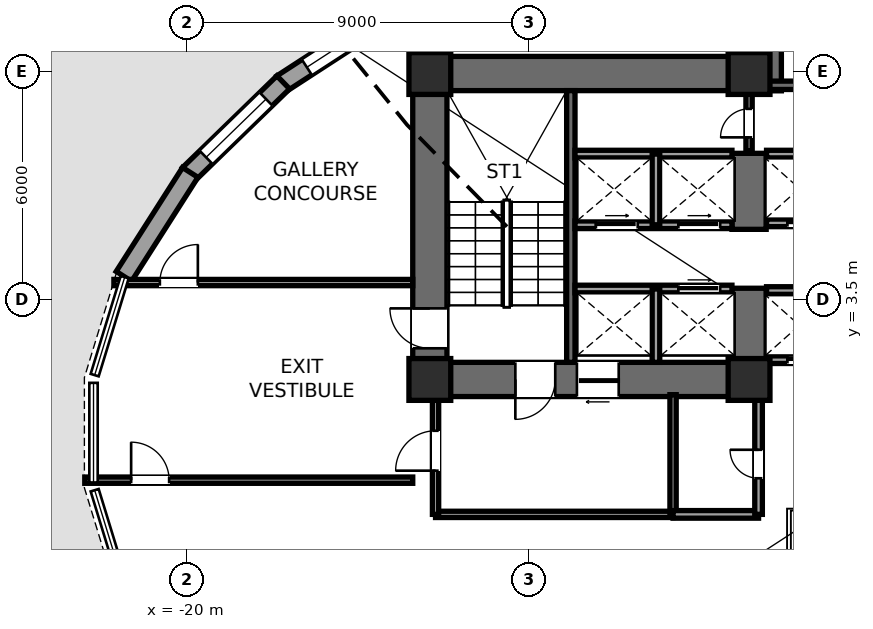
"""IFC4 building model, lengths in metres.
Left out: names, types, materials, properties, quantities, classifications, styles, units other than length and angle.
Written with IfcOpenShell. Run it as: python <this file> out.ifc"""

import sys

from ifc_helpers import new_model, si_unit, direction, frame, frame_2d, origin, origin_2d, place, context, subcontext, project, spatial, rectangle, extrude, element, fill, save


model = new_model("IFC4")
c1 = context("Model", 3, precision=1e-05, world=origin(), true_north=direction((0.0, 1.0)))
c2 = subcontext(c1, "Body", "Model", "MODEL_VIEW")
j1 = project(units=[si_unit("LENGTHUNIT", "METRE"), si_unit("PLANEANGLEUNIT", "RADIAN")], contexts=[c1])
p1 = place(None, origin())
s1 = spatial("IfcSite", under=j1, at=p1, CompositionType="ELEMENT")
p2 = place(p1, origin())
s2 = spatial("IfcBuilding", under=s1, at=p2, CompositionType="ELEMENT")
p3 = place(p2, origin())
s3 = spatial("IfcBuildingStorey", under=s2, at=p3, CompositionType="ELEMENT", Elevation=0.0)
p4 = place(p3, frame((-13.6, 0.95, 0.0), z_axis=(0.0, 0.0, 1.0), x_axis=(0.0, 1.0, 0.0)))
e1 = element("IfcWall", 1, at=p4, inside=s3, PredefinedType="SHEAR", context=c2, shape_type="SweptSolid", body=[
    extrude(rectangle(XDim=8.95, YDim=0.9, at=frame_2d((4.475, 0.0))), origin(), (0.0, 0.0, 1.0), 6.0),
])
p5 = place(p4, frame((1.27, 0.0, 0.0)))
e2 = element("IfcOpeningElement", 2, at=p5, cuts=e1, PredefinedType="OPENING", context=c2, shape_type="SweptSolid", body=[
    extrude(rectangle(XDim=1.05, YDim=2.15, at=frame_2d((0.525, 1.075))), frame((0.0, 0.46, 0.0), z_axis=(0.0, -1.0, 0.0), x_axis=(1.0, 0.0, 0.0)), (0.0, 0.0, 1.0), 0.92),
])
p6 = place(p3, frame((-14.05, 9.45, 0.0), z_axis=(0.0, 0.0, 1.0), x_axis=(1.0, 0.0, 0.0)))
e3 = element("IfcWall", 3, at=p6, inside=s3, PredefinedType="SHEAR", context=c2, shape_type="SweptSolid", body=[
    extrude(rectangle(XDim=9.7, YDim=0.9, at=frame_2d((4.85, 0.0))), origin(), (0.0, 0.0, 1.0), 6.0),
])
p7 = place(p3, frame((-4.75, 1.4, 0.0), z_axis=(0.0, 0.0, 1.0), x_axis=(-1.0, 0.0, 0.0)))
e4 = element("IfcWall", 4, at=p7, inside=s3, PredefinedType="SHEAR", context=c2, shape_type="SweptSolid", body=[
    extrude(rectangle(XDim=9.3, YDim=0.9, at=frame_2d((4.65, 0.0))), origin(), (0.0, 0.0, 1.0), 6.0),
])
p8 = place(p7, frame((5.55, 0.0, 0.0)))
e5 = element("IfcOpeningElement", 5, at=p8, cuts=e4, PredefinedType="OPENING", context=c2, shape_type="SweptSolid", body=[
    extrude(rectangle(XDim=1.05, YDim=2.15, at=frame_2d((0.525, 1.075))), frame((0.0, 0.46, 0.0), z_axis=(0.0, -1.0, 0.0), x_axis=(1.0, 0.0, 0.0)), (0.0, 0.0, 1.0), 0.92),
])
p9 = place(p7, frame((3.88, 0.0, 0.0)))
e6 = element("IfcOpeningElement", 6, at=p9, cuts=e4, PredefinedType="OPENING", context=c2, shape_type="SweptSolid", body=[
    extrude(rectangle(XDim=1.1, YDim=2.2, at=frame_2d((0.55, 1.1))), frame((0.0, 0.46, 0.0), z_axis=(0.0, -1.0, 0.0), x_axis=(1.0, 0.0, 0.0)), (0.0, 0.0, 1.0), 0.92),
])
p10 = place(p3, frame((-5.2, 0.95, 0.0), z_axis=(0.0, 0.0, 1.0), x_axis=(0.0, 1.0, 0.0)))
e7 = element("IfcWall", 7, at=p10, inside=s3, PredefinedType="SHEAR", context=c2, shape_type="SweptSolid", body=[
    extrude(rectangle(XDim=2.85, YDim=0.9, at=frame_2d((1.425, 0.0))), origin(), (0.0, 0.0, 1.0), 6.0),
])
p11 = place(p3, frame((-5.2, 5.35, 0.0), z_axis=(0.0, 0.0, 1.0), x_axis=(0.0, 1.0, 0.0)))
e8 = element("IfcWall", 8, at=p11, inside=s3, PredefinedType="SHEAR", context=c2, shape_type="SweptSolid", body=[
    extrude(rectangle(XDim=2.0, YDim=0.9, at=frame_2d((1.0, 0.0))), origin(), (0.0, 0.0, 1.0), 6.0),
])
p12 = place(p3, frame((-9.89, 1.85, 0.0), z_axis=(0.0, 0.0, 1.0), x_axis=(0.0, 1.0, 0.0)))
e9 = element("IfcWall", 9, at=p12, inside=s3, PredefinedType="SHEAR", context=c2, shape_type="SweptSolid", body=[
    extrude(rectangle(XDim=7.15, YDim=0.22, at=frame_2d((3.575, 0.0))), origin(), (0.0, 0.0, 1.0), 6.0),
])
p13 = place(p3, frame((-4.8, 9.0, 0.0), z_axis=(0.0, 0.0, 1.0), x_axis=(0.0, 1.0, 0.0)))
e10 = element("IfcWall", 10, at=p13, inside=s3, PredefinedType="SHEAR", context=c2, shape_type="SweptSolid", body=[
    extrude(rectangle(XDim=4.3, YDim=0.9, at=frame_2d((2.15, 0.0))), origin(), (0.0, 0.0, 1.0), 6.0),
])
p14 = place(p3, frame((-4.7, 9.14, 0.0), z_axis=(0.0, 0.0, 1.0), x_axis=(1.0, 0.0, 0.0)))
e11 = element("IfcWall", 11, at=p14, inside=s3, PredefinedType="SHEAR", context=c2, shape_type="SweptSolid", body=[
    extrude(rectangle(XDim=9.3, YDim=0.22, at=frame_2d((4.65, 0.0))), origin(), (0.0, 0.0, 1.0), 6.0),
])
p15 = place(p14, frame((1.15, 0.0, 0.0)))
e12 = element("IfcOpeningElement", 12, at=p15, cuts=e11, PredefinedType="OPENING", context=c2, shape_type="SweptSolid", body=[
    extrude(rectangle(XDim=1.05, YDim=2.15, at=frame_2d((0.525, 1.075))), frame((0.0, 0.12, 0.0), z_axis=(0.0, -1.0, 0.0), x_axis=(1.0, 0.0, 0.0)), (0.0, 0.0, 1.0), 0.24),
])
for number, where, z_axis, x_axis in (
    (13, (-13.6, 1.4, 0.0), (0.0, 0.0, 1.0), (1.0, 0.0, 0.0)),
    (14, (-13.6, 9.45, 0.0), (0.0, 0.0, 1.0), (1.0, 0.0, 0.0)),
    (15, (-5.2, 1.4, 0.0), (0.0, 0.0, 1.0), (1.0, 0.0, 0.0)),
    (16, (-5.2, 9.45, 0.0), (0.0, 0.0, 1.0), (1.0, 0.0, 0.0)),
):
    element("IfcColumn", number, at=place(p3, frame(where, z_axis=z_axis, x_axis=x_axis)), inside=s3, PredefinedType="COLUMN", context=c2, shape_type="SweptSolid", body=[
        extrude(rectangle(XDim=1.1, YDim=1.1, at=origin_2d()), origin(), (0.0, 0.0, 1.0), 6.0),
    ])
p16 = place(p3, frame((-17.494, 9.188, 0.0), z_axis=(0.0, 0.0, 1.0), x_axis=(0.838776546814, 0.544475807098, 0.0)))
e17 = element("IfcWall", 17, at=p16, inside=s3, PredefinedType="STANDARD", context=c2, shape_type="SweptSolid", body=[
    extrude(rectangle(XDim=3.768, YDim=0.48, at=frame_2d((1.884, 0.0))), origin(), (0.0, 0.0, 1.0), 4.913),
])
p17 = place(p16, frame((0.784, 0.0, 0.85)))
e18 = element("IfcOpeningElement", 18, at=p17, cuts=e17, PredefinedType="OPENING", context=c2, shape_type="SweptSolid", body=[
    extrude(rectangle(XDim=2.2, YDim=1.95, at=frame_2d((1.1, 0.975))), frame((0.0, 0.25, 0.0), z_axis=(0.0, -1.0, 0.0), x_axis=(1.0, 0.0, 0.0)), (0.0, 0.0, 1.0), 0.5),
])
p18 = place(p3, frame((-19.941, 6.805, 0.0), z_axis=(0.0, 0.0, 1.0), x_axis=(0.717293479468, 0.696771170696, 0.0)))
e19 = element("IfcWall", 19, at=p18, inside=s3, PredefinedType="STANDARD", context=c2, shape_type="SweptSolid", body=[
    extrude(rectangle(XDim=3.462, YDim=0.48, at=frame_2d((1.731, 0.0))), origin(), (0.0, 0.0, 1.0), 4.913),
])
p19 = place(p18, frame((0.631, 0.0, 0.85)))
e20 = element("IfcOpeningElement", 20, at=p19, cuts=e19, PredefinedType="OPENING", context=c2, shape_type="SweptSolid", body=[
    extrude(rectangle(XDim=2.2, YDim=1.95, at=frame_2d((1.1, 0.975))), frame((0.0, 0.25, 0.0), z_axis=(0.0, -1.0, 0.0), x_axis=(1.0, 0.0, 0.0)), (0.0, 0.0, 1.0), 0.5),
])
p20 = place(p3, frame((-21.651, 4.112, 0.0), z_axis=(0.0, 0.0, 1.0), x_axis=(0.537902363654, 0.843007145388, 0.0)))
e21 = element("IfcWall", 21, at=p20, inside=s3, PredefinedType="STANDARD", context=c2, shape_type="SweptSolid", body=[
    extrude(rectangle(XDim=3.245, YDim=0.48, at=frame_2d((1.623, 0.0))), origin(), (0.0, 0.0, 1.0), 4.913),
])
p21 = place(p3, frame((-13.45, -2.15, 0.0), z_axis=(0.0, 0.0, 1.0), x_axis=(1.0, 0.0, 0.0)))
e22 = element("IfcWall", 22, at=p21, inside=s3, PredefinedType="PARTITIONING", context=c2, shape_type="SweptSolid", body=[
    extrude(rectangle(XDim=6.25, YDim=0.165, at=frame_2d((3.125, 0.0))), origin(), (0.0, 0.0, 1.0), 5.78),
])
p22 = place(p3, frame((-13.45, -2.15, 0.0), z_axis=(0.0, 0.0, 1.0), x_axis=(0.0, 1.0, 0.0)))
e23 = element("IfcWall", 23, at=p22, inside=s3, PredefinedType="PARTITIONING", context=c2, shape_type="SweptSolid", body=[
    extrude(rectangle(XDim=3.15, YDim=0.165, at=frame_2d((1.575, 0.0))), origin(), (0.0, 0.0, 1.0), 5.233),
])
p23 = place(p22, frame((1.15, 0.0, 0.0)))
e24 = element("IfcOpeningElement", 24, at=p23, cuts=e23, PredefinedType="OPENING", context=c2, shape_type="SweptSolid", body=[
    extrude(rectangle(XDim=1.05, YDim=2.15, at=frame_2d((0.525, 1.075))), frame((0.0, 0.093, 0.0), z_axis=(0.0, -1.0, 0.0), x_axis=(1.0, 0.0, 0.0)), (0.0, 0.0, 1.0), 0.185),
])
p24 = place(p3, frame((-7.2, -2.15, 0.0), z_axis=(0.0, 0.0, 1.0), x_axis=(0.0, 1.0, 0.0)))
e25 = element("IfcWall", 25, at=p24, inside=s3, PredefinedType="PARTITIONING", context=c2, shape_type="SweptSolid", body=[
    extrude(rectangle(XDim=3.15, YDim=0.165, at=frame_2d((1.575, 0.0))), origin(), (0.0, 0.0, 1.0), 5.78),
])
p25 = place(p3, frame((-7.2, -2.15, 0.0), z_axis=(0.0, 0.0, 1.0), x_axis=(1.0, 0.0, 0.0)))
e26 = element("IfcWall", 26, at=p25, inside=s3, PredefinedType="SOLIDWALL", context=c2, shape_type="SweptSolid", body=[
    extrude(rectangle(XDim=2.25, YDim=0.2, at=frame_2d((1.125, 0.0))), origin(), (0.0, 0.0, 1.0), 5.78),
])
p26 = place(p3, frame((-4.95, -2.15, 0.0), z_axis=(0.0, 0.0, 1.0), x_axis=(0.0, 1.0, 0.0)))
e27 = element("IfcWall", 27, at=p26, inside=s3, PredefinedType="SOLIDWALL", context=c2, shape_type="SweptSolid", body=[
    extrude(rectangle(XDim=3.15, YDim=0.2, at=frame_2d((1.575, 0.0))), origin(), (0.0, 0.0, 1.0), 5.148),
])
p27 = place(p26, frame((0.95, 0.0, 0.0)))
e28 = element("IfcOpeningElement", 28, at=p27, cuts=e27, PredefinedType="OPENING", context=c2, shape_type="SweptSolid", body=[
    extrude(rectangle(XDim=0.75, YDim=2.1, at=frame_2d((0.375, 1.05))), frame((0.0, 0.11, 0.0), z_axis=(0.0, -1.0, 0.0), x_axis=(1.0, 0.0, 0.0)), (0.0, 0.0, 1.0), 0.22),
])
p28 = place(p3, frame((-9.78, 3.78, 0.0), z_axis=(0.0, 0.0, 1.0), x_axis=(1.0, 0.0, 0.0)))
e29 = element("IfcWall", 29, at=p28, inside=s3, PredefinedType="SOLIDWALL", context=c2, shape_type="SweptSolid", body=[
    extrude(rectangle(XDim=4.13, YDim=0.2, at=frame_2d((2.065, 0.0))), origin(), (0.0, 0.0, 1.0), 5.78),
])
p29 = place(p28, frame((2.72, 0.0, 0.0)))
e30 = element("IfcOpeningElement", 30, at=p29, cuts=e29, PredefinedType="OPENING", context=c2, shape_type="SweptSolid", body=[
    extrude(rectangle(XDim=1.1, YDim=2.2, at=frame_2d((0.55, 1.1))), frame((0.0, 0.11, 0.0), z_axis=(0.0, -1.0, 0.0), x_axis=(1.0, 0.0, 0.0)), (0.0, 0.0, 1.0), 0.22),
])
p30 = place(p3, frame((-7.65, 1.85, 0.0), z_axis=(0.0, 0.0, 1.0), x_axis=(0.0, 1.0, 0.0)))
e31 = element("IfcWall", 31, at=p30, inside=s3, PredefinedType="SOLIDWALL", context=c2, shape_type="SweptSolid", body=[
    extrude(rectangle(XDim=1.93, YDim=0.2, at=frame_2d((0.965, 0.0))), origin(), (0.0, 0.0, 1.0), 5.78),
])
p31 = place(p3, frame((-9.78, 5.47, 0.0), z_axis=(0.0, 0.0, 1.0), x_axis=(1.0, 0.0, 0.0)))
e32 = element("IfcWall", 32, at=p31, inside=s3, PredefinedType="SOLIDWALL", context=c2, shape_type="SweptSolid", body=[
    extrude(rectangle(XDim=4.13, YDim=0.2, at=frame_2d((2.065, 0.0))), origin(), (0.0, 0.0, 1.0), 5.78),
])
p32 = place(p31, frame((0.55, 0.0, 0.0)))
e33 = element("IfcOpeningElement", 33, at=p32, cuts=e32, PredefinedType="OPENING", context=c2, shape_type="SweptSolid", body=[
    extrude(rectangle(XDim=1.1, YDim=2.2, at=frame_2d((0.55, 1.1))), frame((0.0, 0.11, 0.0), z_axis=(0.0, -1.0, 0.0), x_axis=(1.0, 0.0, 0.0)), (0.0, 0.0, 1.0), 0.22),
])
p33 = place(p31, frame((2.72, 0.0, 0.0)))
e34 = element("IfcOpeningElement", 34, at=p33, cuts=e32, PredefinedType="OPENING", context=c2, shape_type="SweptSolid", body=[
    extrude(rectangle(XDim=1.1, YDim=2.2, at=frame_2d((0.55, 1.1))), frame((0.0, 0.11, 0.0), z_axis=(0.0, -1.0, 0.0), x_axis=(1.0, 0.0, 0.0)), (0.0, 0.0, 1.0), 0.22),
])
p34 = place(p3, frame((-9.78, 7.33, 0.0), z_axis=(0.0, 0.0, 1.0), x_axis=(1.0, 0.0, 0.0)))
e35 = element("IfcWall", 35, at=p34, inside=s3, PredefinedType="SOLIDWALL", context=c2, shape_type="SweptSolid", body=[
    extrude(rectangle(XDim=4.13, YDim=0.2, at=frame_2d((2.065, 0.0))), origin(), (0.0, 0.0, 1.0), 5.78),
])
p35 = place(p3, frame((-7.65, 5.47, 0.0), z_axis=(0.0, 0.0, 1.0), x_axis=(0.0, 1.0, 0.0)))
e36 = element("IfcWall", 36, at=p35, inside=s3, PredefinedType="SOLIDWALL", context=c2, shape_type="SweptSolid", body=[
    extrude(rectangle(XDim=1.86, YDim=0.2, at=frame_2d((0.93, 0.0))), origin(), (0.0, 0.0, 1.0), 5.78),
])
p36 = place(p3, frame((-4.74, 1.92, 0.0), z_axis=(0.0, 0.0, 1.0), x_axis=(1.0, 0.0, 0.0)))
e37 = element("IfcWall", 37, at=p36, inside=s3, PredefinedType="SOLIDWALL", context=c2, shape_type="SweptSolid", body=[
    extrude(rectangle(XDim=3.86, YDim=0.2, at=frame_2d((1.93, 0.0))), origin(), (0.0, 0.0, 1.0), 4.77),
])
p37 = place(p36, frame((0.55, 0.0, 0.0)))
e38 = element("IfcOpeningElement", 38, at=p37, cuts=e37, PredefinedType="OPENING", context=c2, shape_type="SweptSolid", body=[
    extrude(rectangle(XDim=1.1, YDim=2.2, at=frame_2d((0.55, 1.1))), frame((0.0, 0.11, 0.0), z_axis=(0.0, -1.0, 0.0), x_axis=(1.0, 0.0, 0.0)), (0.0, 0.0, 1.0), 0.22),
])
p38 = place(p36, frame((2.55, 0.0, 0.0)))
e39 = element("IfcOpeningElement", 39, at=p38, cuts=e37, PredefinedType="OPENING", context=c2, shape_type="SweptSolid", body=[
    extrude(rectangle(XDim=1.1, YDim=2.2, at=frame_2d((0.55, 1.1))), frame((0.0, 0.11, 0.0), z_axis=(0.0, -1.0, 0.0), x_axis=(1.0, 0.0, 0.0)), (0.0, 0.0, 1.0), 0.22),
])
p39 = place(p3, frame((-4.74, 3.74, 0.0), z_axis=(0.0, 0.0, 1.0), x_axis=(1.0, 0.0, 0.0)))
e40 = element("IfcWall", 40, at=p39, inside=s3, PredefinedType="SOLIDWALL", context=c2, shape_type="SweptSolid", body=[
    extrude(rectangle(XDim=3.86, YDim=0.2, at=frame_2d((1.93, 0.0))), origin(), (0.0, 0.0, 1.0), 5.78),
])
p40 = place(p3, frame((-4.74, 5.52, 0.0), z_axis=(0.0, 0.0, 1.0), x_axis=(1.0, 0.0, 0.0)))
e41 = element("IfcWall", 41, at=p40, inside=s3, PredefinedType="SOLIDWALL", context=c2, shape_type="SweptSolid", body=[
    extrude(rectangle(XDim=3.86, YDim=0.2, at=frame_2d((1.93, 0.0))), origin(), (0.0, 0.0, 1.0), 5.78),
])
p41 = place(p40, frame((0.55, 0.0, 0.0)))
e42 = element("IfcOpeningElement", 42, at=p41, cuts=e41, PredefinedType="OPENING", context=c2, shape_type="SweptSolid", body=[
    extrude(rectangle(XDim=1.1, YDim=2.2, at=frame_2d((0.55, 1.1))), frame((0.0, 0.11, 0.0), z_axis=(0.0, -1.0, 0.0), x_axis=(1.0, 0.0, 0.0)), (0.0, 0.0, 1.0), 0.22),
])
p42 = place(p40, frame((2.3, 0.0, 0.0)))
e43 = element("IfcOpeningElement", 43, at=p42, cuts=e41, PredefinedType="OPENING", context=c2, shape_type="SweptSolid", body=[
    extrude(rectangle(XDim=1.1, YDim=2.2, at=frame_2d((0.55, 1.1))), frame((0.0, 0.11, 0.0), z_axis=(0.0, -1.0, 0.0), x_axis=(1.0, 0.0, 0.0)), (0.0, 0.0, 1.0), 0.22),
])
p43 = place(p3, frame((-4.74, 7.33, 0.0), z_axis=(0.0, 0.0, 1.0), x_axis=(1.0, 0.0, 0.0)))
e44 = element("IfcWall", 44, at=p43, inside=s3, PredefinedType="SOLIDWALL", context=c2, shape_type="SweptSolid", body=[
    extrude(rectangle(XDim=3.86, YDim=0.2, at=frame_2d((1.93, 0.0))), origin(), (0.0, 0.0, 1.0), 5.78),
])
p44 = place(p3, frame((-5.2, 7.42, 0.0), z_axis=(0.0, 0.0, 1.0), x_axis=(0.0, 1.0, 0.0)))
e45 = element("IfcWall", 45, at=p44, inside=s3, PredefinedType="PARTITIONING", context=c2, shape_type="SweptSolid", body=[
    extrude(rectangle(XDim=1.58, YDim=0.165, at=frame_2d((0.79, 0.0))), origin(), (0.0, 0.0, 1.0), 5.78),
])
p45 = place(p44, frame((0.35, 0.0, 0.0)))
e46 = element("IfcOpeningElement", 46, at=p45, cuts=e45, PredefinedType="OPENING", context=c2, shape_type="SweptSolid", body=[
    extrude(rectangle(XDim=0.75, YDim=2.1, at=frame_2d((0.375, 1.05))), frame((0.0, 0.093, 0.0), z_axis=(0.0, -1.0, 0.0), x_axis=(1.0, 0.0, 0.0)), (0.0, 0.0, 1.0), 0.185),
])
p46 = place(p3, frame((-22.68, -1.25, 0.0), z_axis=(0.0, 0.0, 1.0), x_axis=(1.0, 0.0, 0.0)))
e47 = element("IfcWall", 47, at=p46, inside=s3, PredefinedType="PARTITIONING", context=c2, shape_type="SweptSolid", body=[
    extrude(rectangle(XDim=8.63, YDim=0.165, at=frame_2d((4.315, 0.0))), origin(), (0.0, 0.0, 1.0), 5.148),
])
p47 = place(p46, frame((1.22, 0.0, 0.0)))
e48 = element("IfcOpeningElement", 48, at=p47, cuts=e47, PredefinedType="OPENING", context=c2, shape_type="SweptSolid", body=[
    extrude(rectangle(XDim=1.0, YDim=2.15, at=frame_2d((0.5, 1.075))), frame((0.0, 0.093, 0.0), z_axis=(0.0, -1.0, 0.0), x_axis=(1.0, 0.0, 0.0)), (0.0, 0.0, 1.0), 0.185),
])
p48 = place(p3, frame((-21.914, 3.95, 0.0), z_axis=(0.0, 0.0, 1.0), x_axis=(1.0, 0.0, 0.0)))
e49 = element("IfcWall", 49, at=p48, inside=s3, PredefinedType="PARTITIONING", context=c2, shape_type="SweptSolid", body=[
    extrude(rectangle(XDim=7.864, YDim=0.165, at=frame_2d((3.932, 0.0))), origin(), (0.0, 0.0, 1.0), 5.233),
])
p49 = place(p48, frame((1.209, 0.0, 0.0)))
e50 = element("IfcOpeningElement", 50, at=p49, cuts=e49, PredefinedType="OPENING", context=c2, shape_type="SweptSolid", body=[
    extrude(rectangle(XDim=1.0, YDim=2.15, at=frame_2d((0.5, 1.075))), frame((0.0, 0.093, 0.0), z_axis=(0.0, -1.0, 0.0), x_axis=(1.0, 0.0, 0.0)), (0.0, 0.0, 1.0), 0.185),
])
p50 = place(p17, origin())
e51 = element("IfcWindow", 51, at=p50, inside=s3, PartitioningType="SINGLE_PANEL", PredefinedType="WINDOW", context=c2, shape_type="SweptSolid", body=[
    extrude(rectangle(XDim=2.2, YDim=1.95, at=frame_2d((1.1, 0.975))), frame((0.0, -0.01, 0.0), z_axis=(0.0, -1.0, 0.0), x_axis=(1.0, 0.0, 0.0)), (0.0, 0.0, 1.0), 0.06),
])
fill(e18, e51)
p51 = place(p19, origin())
e52 = element("IfcWindow", 52, at=p51, inside=s3, PartitioningType="SINGLE_PANEL", PredefinedType="WINDOW", context=c2, shape_type="SweptSolid", body=[
    extrude(rectangle(XDim=2.2, YDim=1.95, at=frame_2d((1.1, 0.975))), frame((0.0, -0.01, 0.0), z_axis=(0.0, -1.0, 0.0), x_axis=(1.0, 0.0, 0.0)), (0.0, 0.0, 1.0), 0.06),
])
fill(e20, e52)
p52 = place(p8, origin())
e53 = element("IfcDoor", 53, at=p52, inside=s3, OperationType="SINGLE_SWING_RIGHT", PredefinedType="DOOR", context=c2, shape_type="SweptSolid", body=[
    extrude(rectangle(XDim=1.05, YDim=2.15, at=frame_2d((0.525, 1.075))), frame((0.0, 0.025, 0.0), z_axis=(0.0, -1.0, 0.0), x_axis=(1.0, 0.0, 0.0)), (0.0, 0.0, 1.0), 0.05),
])
fill(e5, e53)
p53 = place(p5, origin())
e54 = element("IfcDoor", 54, at=p53, inside=s3, OperationType="SINGLE_SWING_RIGHT", PredefinedType="DOOR", context=c2, shape_type="SweptSolid", body=[
    extrude(rectangle(XDim=1.05, YDim=2.15, at=frame_2d((0.525, 1.075))), frame((0.0, 0.025, 0.0), z_axis=(0.0, -1.0, 0.0), x_axis=(1.0, 0.0, 0.0)), (0.0, 0.0, 1.0), 0.05),
])
fill(e2, e54)
p54 = place(p23, origin())
e55 = element("IfcDoor", 55, at=p54, inside=s3, OperationType="SINGLE_SWING_LEFT", PredefinedType="DOOR", context=c2, shape_type="SweptSolid", body=[
    extrude(rectangle(XDim=1.05, YDim=2.15, at=frame_2d((0.525, 1.075))), frame((0.0, 0.025, 0.0), z_axis=(0.0, -1.0, 0.0), x_axis=(1.0, 0.0, 0.0)), (0.0, 0.0, 1.0), 0.05),
])
fill(e24, e55)
p55 = place(p27, origin())
e56 = element("IfcDoor", 56, at=p55, inside=s3, OperationType="SINGLE_SWING_RIGHT", PredefinedType="DOOR", context=c2, shape_type="SweptSolid", body=[
    extrude(rectangle(XDim=0.75, YDim=2.1, at=frame_2d((0.375, 1.05))), frame((0.0, 0.025, 0.0), z_axis=(0.0, -1.0, 0.0), x_axis=(1.0, 0.0, 0.0)), (0.0, 0.0, 1.0), 0.05),
])
fill(e28, e56)
p56 = place(p9, origin())
e57 = element("IfcDoor", 57, at=p56, inside=s3, OperationType="SLIDING_TO_LEFT", PredefinedType="DOOR", context=c2, shape_type="SweptSolid", body=[
    extrude(rectangle(XDim=1.1, YDim=2.2, at=frame_2d((0.55, 1.1))), frame((0.0, 0.025, 0.0), z_axis=(0.0, -1.0, 0.0), x_axis=(1.0, 0.0, 0.0)), (0.0, 0.0, 1.0), 0.05),
])
fill(e6, e57)
p57 = place(p32, origin())
e58 = element("IfcDoor", 58, at=p57, inside=s3, OperationType="SLIDING_TO_LEFT", PredefinedType="DOOR", context=c2, shape_type="SweptSolid", body=[
    extrude(rectangle(XDim=1.1, YDim=2.2, at=frame_2d((0.55, 1.1))), frame((0.0, 0.025, 0.0), z_axis=(0.0, -1.0, 0.0), x_axis=(1.0, 0.0, 0.0)), (0.0, 0.0, 1.0), 0.05),
])
fill(e33, e58)
p58 = place(p33, origin())
e59 = element("IfcDoor", 59, at=p58, inside=s3, OperationType="SLIDING_TO_LEFT", PredefinedType="DOOR", context=c2, shape_type="SweptSolid", body=[
    extrude(rectangle(XDim=1.1, YDim=2.2, at=frame_2d((0.55, 1.1))), frame((0.0, 0.025, 0.0), z_axis=(0.0, -1.0, 0.0), x_axis=(1.0, 0.0, 0.0)), (0.0, 0.0, 1.0), 0.05),
])
fill(e34, e59)
p59 = place(p29, origin())
e60 = element("IfcDoor", 60, at=p59, inside=s3, OperationType="SLIDING_TO_LEFT", PredefinedType="DOOR", context=c2, shape_type="SweptSolid", body=[
    extrude(rectangle(XDim=1.1, YDim=2.2, at=frame_2d((0.55, 1.1))), frame((0.0, 0.025, 0.0), z_axis=(0.0, -1.0, 0.0), x_axis=(1.0, 0.0, 0.0)), (0.0, 0.0, 1.0), 0.05),
])
fill(e30, e60)
p60 = place(p37, origin())
e61 = element("IfcDoor", 61, at=p60, inside=s3, OperationType="SLIDING_TO_LEFT", PredefinedType="DOOR", context=c2, shape_type="SweptSolid", body=[
    extrude(rectangle(XDim=1.1, YDim=2.2, at=frame_2d((0.55, 1.1))), frame((0.0, 0.025, 0.0), z_axis=(0.0, -1.0, 0.0), x_axis=(1.0, 0.0, 0.0)), (0.0, 0.0, 1.0), 0.05),
])
fill(e38, e61)
p61 = place(p41, origin())
e62 = element("IfcDoor", 62, at=p61, inside=s3, OperationType="SLIDING_TO_LEFT", PredefinedType="DOOR", context=c2, shape_type="SweptSolid", body=[
    extrude(rectangle(XDim=1.1, YDim=2.2, at=frame_2d((0.55, 1.1))), frame((0.0, 0.025, 0.0), z_axis=(0.0, -1.0, 0.0), x_axis=(1.0, 0.0, 0.0)), (0.0, 0.0, 1.0), 0.05),
])
fill(e42, e62)
p62 = place(p45, origin())
e63 = element("IfcDoor", 63, at=p62, inside=s3, OperationType="SINGLE_SWING_LEFT", PredefinedType="DOOR", context=c2, shape_type="SweptSolid", body=[
    extrude(rectangle(XDim=0.75, YDim=2.1, at=frame_2d((0.375, 1.05))), frame((0.0, 0.025, 0.0), z_axis=(0.0, -1.0, 0.0), x_axis=(1.0, 0.0, 0.0)), (0.0, 0.0, 1.0), 0.05),
])
fill(e46, e63)
p63 = place(p49, origin())
e64 = element("IfcDoor", 64, at=p63, inside=s3, OperationType="SINGLE_SWING_RIGHT", PredefinedType="DOOR", context=c2, shape_type="SweptSolid", body=[
    extrude(rectangle(XDim=1.0, YDim=2.15, at=frame_2d((0.5, 1.075))), frame((0.0, 0.025, 0.0), z_axis=(0.0, -1.0, 0.0), x_axis=(1.0, 0.0, 0.0)), (0.0, 0.0, 1.0), 0.05),
])
fill(e50, e64)
p64 = place(p47, origin())
e65 = element("IfcDoor", 65, at=p64, inside=s3, OperationType="SINGLE_SWING_LEFT", PredefinedType="DOOR", context=c2, shape_type="SweptSolid", body=[
    extrude(rectangle(XDim=1.0, YDim=2.15, at=frame_2d((0.5, 1.075))), frame((0.0, 0.025, 0.0), z_axis=(0.0, -1.0, 0.0), x_axis=(1.0, 0.0, 0.0)), (0.0, 0.0, 1.0), 0.05),
])
fill(e48, e65)
save(model, sys.argv[1])
